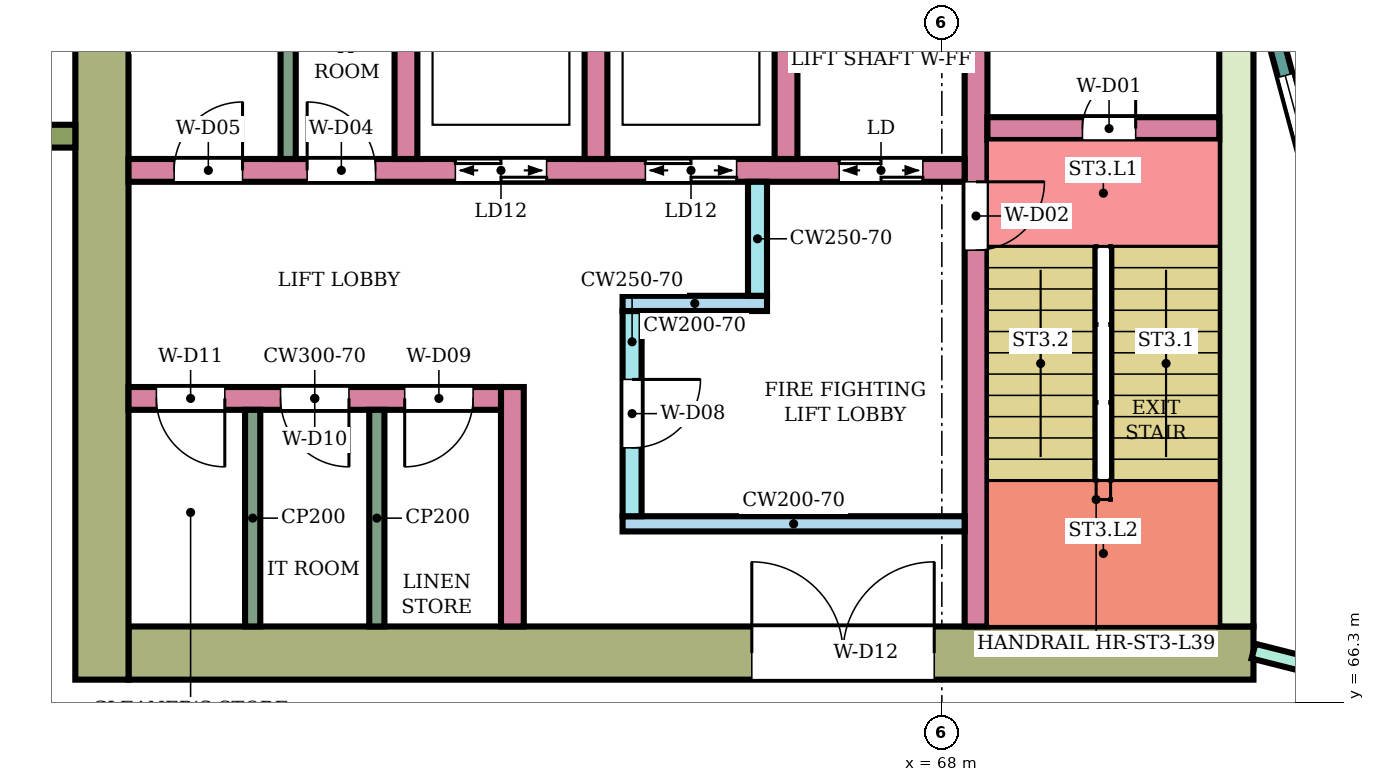
"""IFC4 building model, lengths in metres.
Left out: names, types, materials, properties, quantities, classifications, styles, units other than length and angle.
Written with IfcOpenShell. Run it as: python <this file> out.ifc"""

import sys

from ifc_helpers import new_model, si_unit, direction, frame, frame_2d, origin, place, context, subcontext, project, spatial, rectangle, extrude, element, fill, save


model = new_model("IFC4")
c1 = context("Model", 3, precision=1e-05, world=origin(), true_north=direction((0.0, 1.0)))
c2 = subcontext(c1, "Body", "Model", "MODEL_VIEW")
j1 = project(units=[si_unit("LENGTHUNIT", "METRE"), si_unit("PLANEANGLEUNIT", "RADIAN")], contexts=[c1])
p1 = place(None, origin())
s1 = spatial("IfcSite", under=j1, at=p1, CompositionType="ELEMENT")
p2 = place(p1, origin())
s2 = spatial("IfcBuilding", under=s1, at=p2, CompositionType="ELEMENT")
p3 = place(p2, frame((0.0, 0.0, 170.0)))
s3 = spatial("IfcBuildingStorey", under=s2, at=p3, CompositionType="ELEMENT", Elevation=170.0)
p4 = place(p3, frame((72.1, 66.95, 0.0), z_axis=(0.0, 0.0, 1.0), x_axis=(-1.0, 0.0, 0.0)))
e1 = element("IfcWall", 1, at=p4, inside=s3, PredefinedType="SHEAR", context=c2, shape_type="SweptSolid", body=[
    extrude(rectangle(XDim=14.8, YDim=0.7, at=frame_2d((7.4, 0.0))), origin(), (0.0, 0.0, 1.0), 3.78),
])
p5 = place(p4, frame((4.2, 0.0, 0.0)))
e2 = element("IfcOpeningElement", 2, at=p5, cuts=e1, PredefinedType="OPENING", context=c2, shape_type="SweptSolid", body=[
    extrude(rectangle(XDim=2.4, YDim=2.4, at=frame_2d((1.2, 1.2))), frame((0.0, 0.36, 0.0), z_axis=(0.0, -1.0, 0.0), x_axis=(1.0, 0.0, 0.0)), (0.0, 0.0, 1.0), 0.72),
])
p6 = place(p3, frame((71.875, 75.0, 0.0), z_axis=(0.0, 0.0, 1.0), x_axis=(0.0, -1.0, 0.0)))
e3 = element("IfcWall", 3, at=p6, inside=s3, PredefinedType="SHEAR", context=c2, shape_type="SweptSolid", body=[
    extrude(rectangle(XDim=7.7, YDim=0.45, at=frame_2d((3.85, 0.0))), origin(), (0.0, 0.0, 1.0), 3.78),
])
p7 = place(p3, frame((56.95, 83.4, 0.0), z_axis=(0.0, 0.0, 1.0), x_axis=(0.0, -1.0, 0.0)))
e4 = element("IfcWall", 4, at=p7, inside=s3, PredefinedType="SHEAR", context=c2, shape_type="SweptSolid", body=[
    extrude(rectangle(XDim=16.8, YDim=0.7, at=frame_2d((8.4, 0.0))), origin(), (0.0, 0.0, 1.0), 3.78),
])
p8 = place(p3, frame((68.45, 75.0, 0.0), z_axis=(0.0, 0.0, 1.0), x_axis=(0.0, -1.0, 0.0)))
e5 = element("IfcWall", 5, at=p8, inside=s3, PredefinedType="SHEAR", context=c2, shape_type="SweptSolid", body=[
    extrude(rectangle(XDim=7.7, YDim=0.3, at=frame_2d((3.85, 0.0))), origin(), (0.0, 0.0, 1.0), 3.78),
])
p9 = place(p8, frame((1.85, 0.0, 0.0)))
e6 = element("IfcOpeningElement", 6, at=p9, cuts=e5, PredefinedType="OPENING", context=c2, shape_type="SweptSolid", body=[
    extrude(rectangle(XDim=0.9, YDim=2.1, at=frame_2d((0.45, 1.05))), frame((0.0, 0.16, 0.0), z_axis=(0.0, -1.0, 0.0), x_axis=(1.0, 0.0, 0.0)), (0.0, 0.0, 1.0), 0.32),
])
p10 = place(p3, frame((71.65, 73.85, 0.0), z_axis=(0.0, 0.0, 1.0), x_axis=(-1.0, 0.0, 0.0)))
e7 = element("IfcWall", 7, at=p10, inside=s3, PredefinedType="SHEAR", context=c2, shape_type="SweptSolid", body=[
    extrude(rectangle(XDim=3.05, YDim=0.3, at=frame_2d((1.525, 0.0))), origin(), (0.0, 0.0, 1.0), 3.78),
])
p11 = place(p10, frame((1.1, 0.0, 0.0)))
e8 = element("IfcOpeningElement", 8, at=p11, cuts=e7, PredefinedType="OPENING", context=c2, shape_type="SweptSolid", body=[
    extrude(rectangle(XDim=0.7, YDim=2.0, at=frame_2d((0.35, 1.0))), frame((0.0, 0.16, 0.0), z_axis=(0.0, -1.0, 0.0), x_axis=(1.0, 0.0, 0.0)), (0.0, 0.0, 1.0), 0.32),
])
p12 = place(p3, frame((68.3, 73.3, 0.0), z_axis=(0.0, 0.0, 1.0), x_axis=(-1.0, 0.0, 0.0)))
e9 = element("IfcWall", 9, at=p12, inside=s3, PredefinedType="SHEAR", context=c2, shape_type="SweptSolid", body=[
    extrude(rectangle(XDim=11.0, YDim=0.3, at=frame_2d((5.5, 0.0))), origin(), (0.0, 0.0, 1.0), 3.78),
])
p13 = place(p12, frame((0.55, 0.0, 0.0)))
e10 = element("IfcOpeningElement", 10, at=p13, cuts=e9, PredefinedType="OPENING", context=c2, shape_type="SweptSolid", body=[
    extrude(rectangle(XDim=1.1, YDim=2.1, at=frame_2d((0.55, 1.05))), frame((0.0, 0.16, 0.0), z_axis=(0.0, -1.0, 0.0), x_axis=(1.0, 0.0, 0.0)), (0.0, 0.0, 1.0), 0.32),
])
p14 = place(p12, frame((3.0, 0.0, 0.0)))
e11 = element("IfcOpeningElement", 11, at=p14, cuts=e9, PredefinedType="OPENING", context=c2, shape_type="SweptSolid", body=[
    extrude(rectangle(XDim=1.2, YDim=2.1, at=frame_2d((0.6, 1.05))), frame((0.0, 0.16, 0.0), z_axis=(0.0, -1.0, 0.0), x_axis=(1.0, 0.0, 0.0)), (0.0, 0.0, 1.0), 0.32),
])
p15 = place(p12, frame((5.5, 0.0, 0.0)))
e12 = element("IfcOpeningElement", 12, at=p15, cuts=e9, PredefinedType="OPENING", context=c2, shape_type="SweptSolid", body=[
    extrude(rectangle(XDim=1.2, YDim=2.1, at=frame_2d((0.6, 1.05))), frame((0.0, 0.16, 0.0), z_axis=(0.0, -1.0, 0.0), x_axis=(1.0, 0.0, 0.0)), (0.0, 0.0, 1.0), 0.32),
])
p16 = place(p12, frame((7.75, 0.0, 0.0)))
e13 = element("IfcOpeningElement", 13, at=p16, cuts=e9, PredefinedType="OPENING", context=c2, shape_type="SweptSolid", body=[
    extrude(rectangle(XDim=0.9, YDim=2.1, at=frame_2d((0.45, 1.05))), frame((0.0, 0.16, 0.0), z_axis=(0.0, -1.0, 0.0), x_axis=(1.0, 0.0, 0.0)), (0.0, 0.0, 1.0), 0.32),
])
p17 = place(p12, frame((9.5, 0.0, 0.0)))
e14 = element("IfcOpeningElement", 14, at=p17, cuts=e9, PredefinedType="OPENING", context=c2, shape_type="SweptSolid", body=[
    extrude(rectangle(XDim=0.9, YDim=2.1, at=frame_2d((0.45, 1.05))), frame((0.0, 0.16, 0.0), z_axis=(0.0, -1.0, 0.0), x_axis=(1.0, 0.0, 0.0)), (0.0, 0.0, 1.0), 0.32),
])
for number, where, z_axis, x_axis in (
    (15, (65.95, 76.0, 0.0), (0.0, 0.0, 1.0), (0.0, -1.0, 0.0)),
    (16, (63.45, 76.0, 0.0), (0.0, 0.0, 1.0), (0.0, -1.0, 0.0)),
    (17, (60.95, 76.0, 0.0), (0.0, 0.0, 1.0), (0.0, -1.0, 0.0)),
):
    element("IfcWall", number, at=place(p3, frame(where, z_axis=z_axis, x_axis=x_axis)), inside=s3, PredefinedType="SHEAR", context=c2, shape_type="SweptSolid", body=[
        extrude(rectangle(XDim=2.55, YDim=0.3, at=frame_2d((1.275, 0.0))), origin(), (0.0, 0.0, 1.0), 3.78),
    ])
p18 = place(p3, frame((68.3, 68.65, 0.0), z_axis=(0.0, 0.0, 1.0), x_axis=(-1.0, 0.0, 0.0)))
e18 = element("IfcWall", 18, at=p18, inside=s3, PredefinedType="SHEAR", context=c2, shape_type="SweptSolid", body=[
    extrude(rectangle(XDim=4.5, YDim=0.2, at=frame_2d((2.25, 0.0))), origin(), (0.0, 0.0, 1.0), 3.78),
])
p19 = place(p3, frame((63.925, 71.45, 0.0), z_axis=(0.0, 0.0, 1.0), x_axis=(0.0, -1.0, 0.0)))
e19 = element("IfcWall", 19, at=p19, inside=s3, PredefinedType="SHEAR", context=c2, shape_type="SweptSolid", body=[
    extrude(rectangle(XDim=2.7, YDim=0.25, at=frame_2d((1.35, 0.0))), origin(), (0.0, 0.0, 1.0), 3.78),
])
p20 = place(p19, frame((0.9, 0.0, 0.0)))
e20 = element("IfcOpeningElement", 20, at=p20, cuts=e19, PredefinedType="OPENING", context=c2, shape_type="SweptSolid", body=[
    extrude(rectangle(XDim=0.9, YDim=2.1, at=frame_2d((0.45, 1.05))), frame((0.0, 0.135, 0.0), z_axis=(0.0, -1.0, 0.0), x_axis=(1.0, 0.0, 0.0)), (0.0, 0.0, 1.0), 0.27),
])
p21 = place(p3, frame((65.7, 71.55, 0.0), z_axis=(0.0, 0.0, 1.0), x_axis=(-1.0, 0.0, 0.0)))
e21 = element("IfcWall", 21, at=p21, inside=s3, PredefinedType="SHEAR", context=c2, shape_type="SweptSolid", body=[
    extrude(rectangle(XDim=1.9, YDim=0.2, at=frame_2d((0.95, 0.0))), origin(), (0.0, 0.0, 1.0), 3.78),
])
p22 = place(p3, frame((65.575, 73.15, 0.0), z_axis=(0.0, 0.0, 1.0), x_axis=(0.0, -1.0, 0.0)))
e22 = element("IfcWall", 22, at=p22, inside=s3, PredefinedType="SHEAR", context=c2, shape_type="SweptSolid", body=[
    extrude(rectangle(XDim=1.5, YDim=0.25, at=frame_2d((0.75, 0.0))), origin(), (0.0, 0.0, 1.0), 3.78),
])
p23 = place(p3, frame((62.35, 70.45, 0.0), z_axis=(0.0, 0.0, 1.0), x_axis=(0.0, -1.0, 0.0)))
e23 = element("IfcWall", 23, at=p23, inside=s3, PredefinedType="SHEAR", context=c2, shape_type="SweptSolid", body=[
    extrude(rectangle(XDim=3.15, YDim=0.3, at=frame_2d((1.575, 0.0))), origin(), (0.0, 0.0, 1.0), 3.78),
])
p24 = place(p3, frame((62.2, 70.3, 0.0), z_axis=(0.0, 0.0, 1.0), x_axis=(-1.0, 0.0, 0.0)))
e24 = element("IfcWall", 24, at=p24, inside=s3, PredefinedType="SHEAR", context=c2, shape_type="SweptSolid", body=[
    extrude(rectangle(XDim=4.9, YDim=0.3, at=frame_2d((2.45, 0.0))), origin(), (0.0, 0.0, 1.0), 3.78),
])
p25 = place(p24, frame((0.367, 0.0, 0.0)))
e25 = element("IfcOpeningElement", 25, at=p25, cuts=e24, PredefinedType="OPENING", context=c2, shape_type="SweptSolid", body=[
    extrude(rectangle(XDim=0.9, YDim=2.1, at=frame_2d((0.45, 1.05))), frame((0.0, 0.16, 0.0), z_axis=(0.0, -1.0, 0.0), x_axis=(1.0, 0.0, 0.0)), (0.0, 0.0, 1.0), 0.32),
])
p26 = place(p24, frame((2.0, 0.0, 0.0)))
e26 = element("IfcOpeningElement", 26, at=p26, cuts=e24, PredefinedType="OPENING", context=c2, shape_type="SweptSolid", body=[
    extrude(rectangle(XDim=0.9, YDim=2.1, at=frame_2d((0.45, 1.05))), frame((0.0, 0.16, 0.0), z_axis=(0.0, -1.0, 0.0), x_axis=(1.0, 0.0, 0.0)), (0.0, 0.0, 1.0), 0.32),
])
p27 = place(p24, frame((3.633, 0.0, 0.0)))
e27 = element("IfcOpeningElement", 27, at=p27, cuts=e24, PredefinedType="OPENING", context=c2, shape_type="SweptSolid", body=[
    extrude(rectangle(XDim=0.9, YDim=2.1, at=frame_2d((0.45, 1.05))), frame((0.0, 0.16, 0.0), z_axis=(0.0, -1.0, 0.0), x_axis=(1.0, 0.0, 0.0)), (0.0, 0.0, 1.0), 0.32),
])
p28 = place(p3, frame((56.6, 73.75, 0.0), z_axis=(0.0, 0.0, 1.0), x_axis=(-1.0, 0.0, 0.0)))
e28 = element("IfcWall", 28, at=p28, inside=s3, PredefinedType="NOTDEFINED", context=c2, shape_type="SweptSolid", body=[
    extrude(rectangle(XDim=2.416, YDim=0.3, at=frame_2d((1.208, 0.0))), origin(), (0.0, 0.0, 1.0), 4.1),
])
p29 = place(p3, frame((72.396, 75.0, 0.0), z_axis=(0.0, 0.0, 1.0), x_axis=(0.258789828301, -0.965933654434, 0.0)))
e29 = element("IfcWall", 29, at=p29, inside=s3, PredefinedType="NOTDEFINED", context=c2, shape_type="SweptSolid", body=[
    extrude(rectangle(XDim=3.936, YDim=0.2, at=frame_2d((1.968, 0.0))), origin(), (0.0, 0.0, 1.0), 4.1),
])
p30 = place(p29, frame((0.468, 0.0, 0.9)))
e30 = element("IfcOpeningElement", 30, at=p30, cuts=e29, PredefinedType="OPENING", context=c2, shape_type="SweptSolid", body=[
    extrude(rectangle(XDim=3.0, YDim=2.3, at=frame_2d((1.5, 1.15))), frame((0.0, 0.11, 0.0), z_axis=(0.0, -1.0, 0.0), x_axis=(1.0, 0.0, 0.0)), (0.0, 0.0, 1.0), 0.22),
])
p31 = place(p3, frame((72.1, 66.975, 0.0), z_axis=(0.0, 0.0, 1.0), x_axis=(0.969471314457, -0.245204752086, 0.0)))
e31 = element("IfcWall", 31, at=p31, inside=s3, PredefinedType="PARTITIONING", context=c2, shape_type="SweptSolid", body=[
    extrude(rectangle(XDim=2.582, YDim=0.2, at=frame_2d((1.291, 0.0))), origin(), (0.0, 0.0, 1.0), 3.65),
])
p32 = place(p31, frame((0.841, 0.0, 0.0)))
e32 = element("IfcOpeningElement", 32, at=p32, cuts=e31, PredefinedType="OPENING", context=c2, shape_type="SweptSolid", body=[
    extrude(rectangle(XDim=0.9, YDim=2.1, at=frame_2d((0.45, 1.05))), frame((0.0, 0.11, 0.0), z_axis=(0.0, -1.0, 0.0), x_axis=(1.0, 0.0, 0.0)), (0.0, 0.0, 1.0), 0.22),
])
p33 = place(p3, frame((59.4, 76.0, 0.0), z_axis=(0.0, 0.0, 1.0), x_axis=(0.0, -1.0, 0.0)))
e33 = element("IfcWall", 33, at=p33, inside=s3, PredefinedType="PARTITIONING", context=c2, shape_type="SweptSolid", body=[
    extrude(rectangle(XDim=2.55, YDim=0.2, at=frame_2d((1.275, 0.0))), origin(), (0.0, 0.0, 1.0), 3.78),
])
for number, where, z_axis, x_axis in (
    (34, (60.567, 70.15, 0.0), (0.0, 0.0, 1.0), (0.0, -1.0, 0.0)),
    (35, (58.933, 70.15, 0.0), (0.0, 0.0, 1.0), (0.0, -1.0, 0.0)),
):
    element("IfcWall", number, at=place(p3, frame(where, z_axis=z_axis, x_axis=x_axis)), inside=s3, PredefinedType="PARTITIONING", context=c2, shape_type="SweptSolid", body=[
        extrude(rectangle(XDim=2.85, YDim=0.2, at=frame_2d((1.425, 0.0))), origin(), (0.0, 0.0, 1.0), 3.78),
    ])
p34 = place(p30, origin())
e36 = element("IfcWindow", 36, at=p34, inside=s3, PartitioningType="SINGLE_PANEL", PredefinedType="WINDOW", context=c2, shape_type="SweptSolid", body=[
    extrude(rectangle(XDim=3.0, YDim=2.3, at=frame_2d((1.5, 1.15))), frame((0.0, 0.03, 0.0), z_axis=(0.0, -1.0, 0.0), x_axis=(1.0, 0.0, 0.0)), (0.0, 0.0, 1.0), 0.06),
])
fill(e30, e36)
p35 = place(p11, frame((0.7, 0.0, 0.0), z_axis=(0.0, 0.0, 1.0), x_axis=(-1.0, 0.0, 0.0)))
e37 = element("IfcDoor", 37, at=p35, inside=s3, OperationType="SINGLE_SWING_RIGHT", PredefinedType="DOOR", context=c2, shape_type="SweptSolid", body=[
    extrude(rectangle(XDim=0.7, YDim=2.0, at=frame_2d((0.35, 1.0))), frame((0.0, 0.025, 0.0), z_axis=(0.0, -1.0, 0.0), x_axis=(1.0, 0.0, 0.0)), (0.0, 0.0, 1.0), 0.05),
])
fill(e8, e37)
p36 = place(p9, origin())
e38 = element("IfcDoor", 38, at=p36, inside=s3, OperationType="SINGLE_SWING_LEFT", PredefinedType="DOOR", context=c2, shape_type="SweptSolid", body=[
    extrude(rectangle(XDim=0.9, YDim=2.1, at=frame_2d((0.45, 1.05))), frame((0.0, 0.025, 0.0), z_axis=(0.0, -1.0, 0.0), x_axis=(1.0, 0.0, 0.0)), (0.0, 0.0, 1.0), 0.05),
])
fill(e6, e38)
p37 = place(p13, origin())
e39 = element("IfcDoor", 39, at=p37, inside=s3, OperationType="DOUBLE_DOOR_SLIDING", PredefinedType="DOOR", context=c2, shape_type="SweptSolid", body=[
    extrude(rectangle(XDim=1.1, YDim=2.1, at=frame_2d((0.55, 1.05))), frame((0.0, 0.025, 0.0), z_axis=(0.0, -1.0, 0.0), x_axis=(1.0, 0.0, 0.0)), (0.0, 0.0, 1.0), 0.05),
])
fill(e10, e39)
p38 = place(p14, origin())
e40 = element("IfcDoor", 40, at=p38, inside=s3, OperationType="DOUBLE_DOOR_SLIDING", PredefinedType="DOOR", context=c2, shape_type="SweptSolid", body=[
    extrude(rectangle(XDim=1.2, YDim=2.1, at=frame_2d((0.6, 1.05))), frame((0.0, 0.025, 0.0), z_axis=(0.0, -1.0, 0.0), x_axis=(1.0, 0.0, 0.0)), (0.0, 0.0, 1.0), 0.05),
])
fill(e11, e40)
p39 = place(p15, origin())
e41 = element("IfcDoor", 41, at=p39, inside=s3, OperationType="DOUBLE_DOOR_SLIDING", PredefinedType="DOOR", context=c2, shape_type="SweptSolid", body=[
    extrude(rectangle(XDim=1.2, YDim=2.1, at=frame_2d((0.6, 1.05))), frame((0.0, 0.025, 0.0), z_axis=(0.0, -1.0, 0.0), x_axis=(1.0, 0.0, 0.0)), (0.0, 0.0, 1.0), 0.05),
])
fill(e12, e41)
p40 = place(p16, frame((0.9, 0.0, 0.0), z_axis=(0.0, 0.0, 1.0), x_axis=(-1.0, 0.0, 0.0)))
e42 = element("IfcDoor", 42, at=p40, inside=s3, OperationType="SINGLE_SWING_LEFT", PredefinedType="DOOR", context=c2, shape_type="SweptSolid", body=[
    extrude(rectangle(XDim=0.9, YDim=2.1, at=frame_2d((0.45, 1.05))), frame((0.0, 0.025, 0.0), z_axis=(0.0, -1.0, 0.0), x_axis=(1.0, 0.0, 0.0)), (0.0, 0.0, 1.0), 0.05),
])
fill(e13, e42)
p41 = place(p17, frame((0.9, 0.0, 0.0), z_axis=(0.0, 0.0, 1.0), x_axis=(-1.0, 0.0, 0.0)))
e43 = element("IfcDoor", 43, at=p41, inside=s3, OperationType="SINGLE_SWING_RIGHT", PredefinedType="DOOR", context=c2, shape_type="SweptSolid", body=[
    extrude(rectangle(XDim=0.9, YDim=2.1, at=frame_2d((0.45, 1.05))), frame((0.0, 0.025, 0.0), z_axis=(0.0, -1.0, 0.0), x_axis=(1.0, 0.0, 0.0)), (0.0, 0.0, 1.0), 0.05),
])
fill(e14, e43)
p42 = place(p20, origin())
e44 = element("IfcDoor", 44, at=p42, inside=s3, OperationType="SINGLE_SWING_LEFT", PredefinedType="DOOR", context=c2, shape_type="SweptSolid", body=[
    extrude(rectangle(XDim=0.9, YDim=2.1, at=frame_2d((0.45, 1.05))), frame((0.0, 0.025, 0.0), z_axis=(0.0, -1.0, 0.0), x_axis=(1.0, 0.0, 0.0)), (0.0, 0.0, 1.0), 0.05),
])
fill(e20, e44)
p43 = place(p25, origin())
e45 = element("IfcDoor", 45, at=p43, inside=s3, OperationType="SINGLE_SWING_RIGHT", PredefinedType="DOOR", context=c2, shape_type="SweptSolid", body=[
    extrude(rectangle(XDim=0.9, YDim=2.1, at=frame_2d((0.45, 1.05))), frame((0.0, 0.025, 0.0), z_axis=(0.0, -1.0, 0.0), x_axis=(1.0, 0.0, 0.0)), (0.0, 0.0, 1.0), 0.05),
])
fill(e25, e45)
p44 = place(p26, origin())
e46 = element("IfcDoor", 46, at=p44, inside=s3, OperationType="SINGLE_SWING_LEFT", PredefinedType="DOOR", context=c2, shape_type="SweptSolid", body=[
    extrude(rectangle(XDim=0.9, YDim=2.1, at=frame_2d((0.45, 1.05))), frame((0.0, 0.025, 0.0), z_axis=(0.0, -1.0, 0.0), x_axis=(1.0, 0.0, 0.0)), (0.0, 0.0, 1.0), 0.05),
])
fill(e26, e46)
p45 = place(p27, origin())
e47 = element("IfcDoor", 47, at=p45, inside=s3, OperationType="SINGLE_SWING_LEFT", PredefinedType="DOOR", context=c2, shape_type="SweptSolid", body=[
    extrude(rectangle(XDim=0.9, YDim=2.1, at=frame_2d((0.45, 1.05))), frame((0.0, 0.025, 0.0), z_axis=(0.0, -1.0, 0.0), x_axis=(1.0, 0.0, 0.0)), (0.0, 0.0, 1.0), 0.05),
])
fill(e27, e47)
p46 = place(p5, frame((2.4, 0.0, 0.0), z_axis=(0.0, 0.0, 1.0), x_axis=(-1.0, 0.0, 0.0)))
e48 = element("IfcDoor", 48, at=p46, inside=s3, OperationType="DOUBLE_DOOR_SINGLE_SWING", PredefinedType="DOOR", context=c2, shape_type="SweptSolid", body=[
    extrude(rectangle(XDim=2.4, YDim=2.4, at=frame_2d((1.2, 1.2))), frame((0.0, 0.025, 0.0), z_axis=(0.0, -1.0, 0.0), x_axis=(1.0, 0.0, 0.0)), (0.0, 0.0, 1.0), 0.05),
])
fill(e2, e48)
save(model, sys.argv[1])
